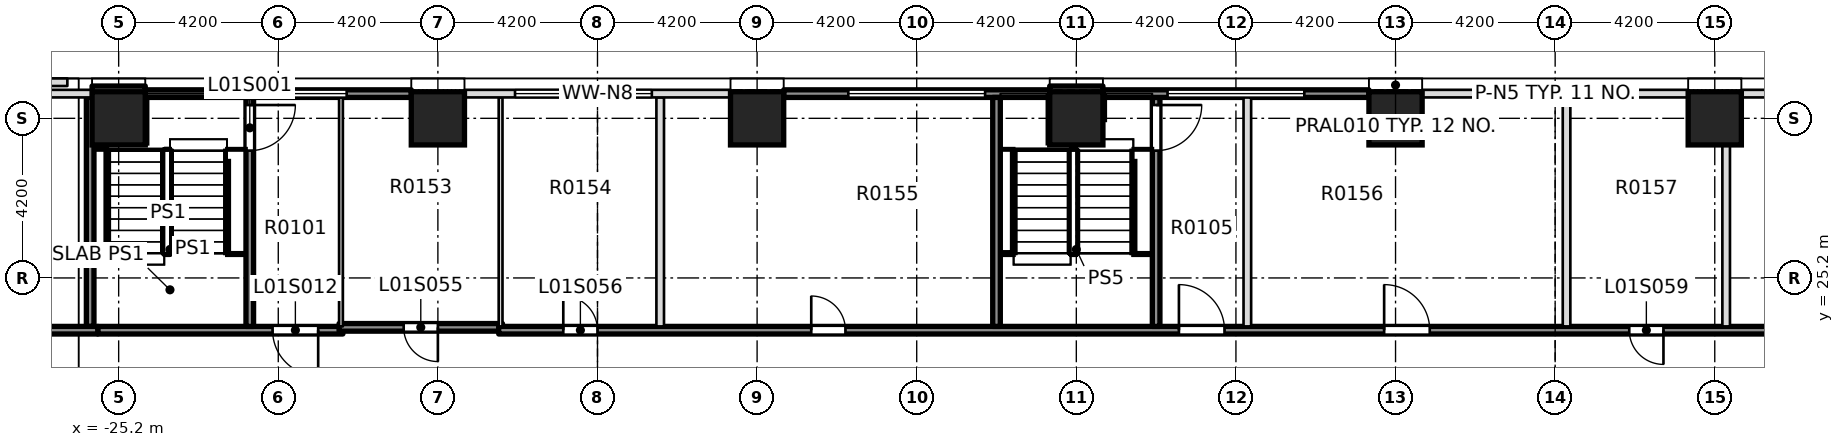
"""IFC4 building model, lengths in metres.
Left out: names, types, materials, properties, quantities, classifications, styles, units other than length and angle.
Written with IfcOpenShell. Run it as: python <this file> out.ifc"""

import sys

from ifc_helpers import new_model, si_unit, direction, frame, frame_2d, origin, origin_2d, place, context, subcontext, project, spatial, rectangle, extrude, element, fill, save


model = new_model("IFC4")
c1 = context("Model", 3, precision=1e-05, world=origin(), true_north=direction((0.0, 1.0)))
c2 = subcontext(c1, "Body", "Model", "MODEL_VIEW")
j1 = project(units=[si_unit("LENGTHUNIT", "METRE"), si_unit("PLANEANGLEUNIT", "RADIAN")], contexts=[c1])
p1 = place(None, origin())
s1 = spatial("IfcSite", under=j1, at=p1, CompositionType="ELEMENT")
p2 = place(p1, origin())
s2 = spatial("IfcBuilding", under=s1, at=p2, CompositionType="ELEMENT")
p3 = place(p2, frame((0.0, 0.0, 7.5)))
s3 = spatial("IfcBuildingStorey", under=s2, at=p3, CompositionType="ELEMENT", Elevation=7.5)
for number, where, z_axis, x_axis in (
    (1, (-25.2, 29.4, 0.0), (0.0, 0.0, 1.0), (1.0, 0.0, 0.0)),
    (2, (-16.8, 29.4, 0.0), (0.0, 0.0, 1.0), (1.0, 0.0, 0.0)),
    (3, (-8.4, 29.4, 0.0), (0.0, 0.0, 1.0), (1.0, 0.0, 0.0)),
    (4, (0.0, 29.4, 0.0), (0.0, 0.0, 1.0), (1.0, 0.0, 0.0)),
    (5, (8.4, 29.4, 0.0), (0.0, 0.0, 1.0), (1.0, 0.0, 0.0)),
    (6, (16.8, 29.4, 0.0), (0.0, 0.0, 1.0), (1.0, 0.0, 0.0)),
):
    element("IfcColumn", number, at=place(p3, frame(where, z_axis=z_axis, x_axis=x_axis)), inside=s3, PredefinedType="COLUMN", context=c2, shape_type="SweptSolid", body=[
        extrude(rectangle(XDim=1.4, YDim=1.4, at=origin_2d()), origin(), (0.0, 0.0, 1.0), 5.0),
    ])
p4 = place(p3, frame((-34.65, 30.35, 5.0), z_axis=(0.0, 0.0, 1.0), x_axis=(1.0, 0.0, 0.0)))
e7 = element("IfcWall", 7, at=p4, inside=s3, PredefinedType="PARAPET", context=c2, shape_type="SweptSolid", body=[
    extrude(rectangle(XDim=8.1, YDim=0.2, at=frame_2d((4.05, 0.0))), origin(), (0.0, 0.0, 1.0), 1.2),
])
p5 = place(p3, frame((-25.75, 23.825, 0.0), z_axis=(0.0, 0.0, 1.0), x_axis=(1.0, 0.0, 0.0)))
e8 = element("IfcWall", 8, at=p5, inside=s3, PredefinedType="SOLIDWALL", context=c2, shape_type="SweptSolid", body=[
    extrude(rectangle(XDim=6.45, YDim=0.2, at=frame_2d((3.225, 0.0))), origin(), (0.0, 0.0, 1.0), 4.6),
])
p6 = place(p5, frame((4.6, 0.0, 0.0)))
e9 = element("IfcOpeningElement", 9, at=p6, cuts=e8, PredefinedType="OPENING", context=c2, shape_type="SweptSolid", body=[
    extrude(rectangle(XDim=1.2, YDim=2.1, at=frame_2d((0.6, 1.05))), frame((0.0, 0.11, 0.0), z_axis=(0.0, -1.0, 0.0), x_axis=(1.0, 0.0, 0.0)), (0.0, 0.0, 1.0), 0.22),
])
p7 = place(p3, frame((-19.4, 23.9, 0.0), z_axis=(0.0, 0.0, 1.0), x_axis=(1.0, 0.0, 0.0)))
e10 = element("IfcWall", 10, at=p7, inside=s3, PredefinedType="SOLIDWALL", context=c2, shape_type="SweptSolid", body=[
    extrude(rectangle(XDim=4.3, YDim=0.2, at=frame_2d((2.15, 0.0))), origin(), (0.0, 0.0, 1.0), 4.6),
])
p8 = place(p7, frame((1.7, 0.0, 0.0)))
e11 = element("IfcOpeningElement", 11, at=p8, cuts=e10, PredefinedType="OPENING", context=c2, shape_type="SweptSolid", body=[
    extrude(rectangle(XDim=0.9, YDim=2.1, at=frame_2d((0.45, 1.05))), frame((0.0, 0.11, 0.0), z_axis=(0.0, -1.0, 0.0), x_axis=(1.0, 0.0, 0.0)), (0.0, 0.0, 1.0), 0.22),
])
p9 = place(p3, frame((-15.2, 23.825, 0.0), z_axis=(0.0, 0.0, 1.0), x_axis=(1.0, 0.0, 0.0)))
e12 = element("IfcWall", 12, at=p9, inside=s3, PredefinedType="SOLIDWALL", context=c2, shape_type="SweptSolid", body=[
    extrude(rectangle(XDim=51.45, YDim=0.2, at=frame_2d((25.725, 0.0))), origin(), (0.0, 0.0, 1.0), 4.6),
])
p10 = place(p9, frame((17.9, 0.0, 0.0)))
e13 = element("IfcOpeningElement", 13, at=p10, cuts=e12, PredefinedType="OPENING", context=c2, shape_type="SweptSolid", body=[
    extrude(rectangle(XDim=1.2, YDim=2.1, at=frame_2d((0.6, 1.05))), frame((0.0, 0.11, 0.0), z_axis=(0.0, -1.0, 0.0), x_axis=(1.0, 0.0, 0.0)), (0.0, 0.0, 1.0), 0.22),
])
p11 = place(p9, frame((1.7, 0.0, 0.0)))
e14 = element("IfcOpeningElement", 14, at=p11, cuts=e12, PredefinedType="OPENING", context=c2, shape_type="SweptSolid", body=[
    extrude(rectangle(XDim=0.9, YDim=2.1, at=frame_2d((0.45, 1.05))), frame((0.0, 0.11, 0.0), z_axis=(0.0, -1.0, 0.0), x_axis=(1.0, 0.0, 0.0)), (0.0, 0.0, 1.0), 0.22),
])
p12 = place(p9, frame((8.225, 0.0, 0.0)))
e15 = element("IfcOpeningElement", 15, at=p12, cuts=e12, PredefinedType="OPENING", context=c2, shape_type="SweptSolid", body=[
    extrude(rectangle(XDim=0.9, YDim=2.1, at=frame_2d((0.45, 1.05))), frame((0.0, 0.11, 0.0), z_axis=(0.0, -1.0, 0.0), x_axis=(1.0, 0.0, 0.0)), (0.0, 0.0, 1.0), 0.22),
])
p13 = place(p9, frame((23.3, 0.0, 0.0)))
e16 = element("IfcOpeningElement", 16, at=p13, cuts=e12, PredefinedType="OPENING", context=c2, shape_type="SweptSolid", body=[
    extrude(rectangle(XDim=1.2, YDim=2.1, at=frame_2d((0.6, 1.05))), frame((0.0, 0.11, 0.0), z_axis=(0.0, -1.0, 0.0), x_axis=(1.0, 0.0, 0.0)), (0.0, 0.0, 1.0), 0.22),
])
p14 = place(p9, frame((29.75, 0.0, 0.0)))
e17 = element("IfcOpeningElement", 17, at=p14, cuts=e12, PredefinedType="OPENING", context=c2, shape_type="SweptSolid", body=[
    extrude(rectangle(XDim=0.9, YDim=2.1, at=frame_2d((0.45, 1.05))), frame((0.0, 0.11, 0.0), z_axis=(0.0, -1.0, 0.0), x_axis=(1.0, 0.0, 0.0)), (0.0, 0.0, 1.0), 0.22),
])
p15 = place(p9, frame((41.375, 0.0, 0.0)))
e18 = element("IfcOpeningElement", 18, at=p15, cuts=e12, PredefinedType="OPENING", context=c2, shape_type="SweptSolid", body=[
    extrude(rectangle(XDim=0.9, YDim=2.1, at=frame_2d((0.45, 1.05))), frame((0.0, 0.11, 0.0), z_axis=(0.0, -1.0, 0.0), x_axis=(1.0, 0.0, 0.0)), (0.0, 0.0, 1.0), 0.22),
])
p16 = place(p3, frame((-21.75, 23.925, 0.0), z_axis=(0.0, 0.0, 1.0), x_axis=(0.0, 1.0, 0.0)))
e19 = element("IfcWall", 19, at=p16, inside=s3, PredefinedType="SOLIDWALL", context=c2, shape_type="SweptSolid", body=[
    extrude(rectangle(XDim=6.025, YDim=0.2, at=frame_2d((3.012, 0.0))), origin(), (0.0, 0.0, 1.0), 4.6),
])
p17 = place(p16, frame((4.625, 0.0, 0.0)))
e20 = element("IfcOpeningElement", 20, at=p17, cuts=e19, PredefinedType="OPENING", context=c2, shape_type="SweptSolid", body=[
    extrude(rectangle(XDim=1.2, YDim=2.1, at=frame_2d((0.6, 1.05))), frame((0.0, 0.11, 0.0), z_axis=(0.0, -1.0, 0.0), x_axis=(1.0, 0.0, 0.0)), (0.0, 0.0, 1.0), 0.22),
])
for number, where, z_axis, x_axis in (
    (21, (-19.35, 23.925, 0.0), (0.0, 0.0, 1.0), (0.0, 1.0, 0.0)),
    (22, (-15.15, 23.925, 0.0), (0.0, 0.0, 1.0), (0.0, 1.0, 0.0)),
):
    element("IfcWall", number, at=place(p3, frame(where, z_axis=z_axis, x_axis=x_axis)), inside=s3, PredefinedType="PARTITIONING", context=c2, shape_type="SweptSolid", body=[
        extrude(rectangle(XDim=6.025, YDim=0.1, at=frame_2d((3.012, 0.0))), origin(), (0.0, 0.0, 1.0), 4.6),
    ])
p18 = place(p3, frame((-10.95, 23.925, 0.0), z_axis=(0.0, 0.0, 1.0), x_axis=(0.0, 1.0, 0.0)))
e23 = element("IfcWall", 23, at=p18, inside=s3, PredefinedType="PARTITIONING", context=c2, shape_type="SweptSolid", body=[
    extrude(rectangle(XDim=6.025, YDim=0.2, at=frame_2d((3.012, 0.0))), origin(), (0.0, 0.0, 1.0), 4.6),
])
p19 = place(p3, frame((2.1, 23.925, 0.0), z_axis=(0.0, 0.0, 1.0), x_axis=(0.0, 1.0, 0.0)))
e24 = element("IfcWall", 24, at=p19, inside=s3, PredefinedType="SOLIDWALL", context=c2, shape_type="SweptSolid", body=[
    extrude(rectangle(XDim=6.025, YDim=0.2, at=frame_2d((3.012, 0.0))), origin(), (0.0, 0.0, 1.0), 4.6),
])
p20 = place(p19, frame((4.625, 0.0, 0.0)))
e25 = element("IfcOpeningElement", 25, at=p20, cuts=e24, PredefinedType="OPENING", context=c2, shape_type="SweptSolid", body=[
    extrude(rectangle(XDim=1.2, YDim=2.1, at=frame_2d((0.6, 1.05))), frame((0.0, 0.11, 0.0), z_axis=(0.0, -1.0, 0.0), x_axis=(1.0, 0.0, 0.0)), (0.0, 0.0, 1.0), 0.22),
])
for number, where, z_axis, x_axis in (
    (26, (4.5, 23.925, 0.0), (0.0, 0.0, 1.0), (0.0, 1.0, 0.0)),
    (27, (12.9, 23.925, 0.0), (0.0, 0.0, 1.0), (0.0, 1.0, 0.0)),
    (28, (17.1, 23.925, 0.0), (0.0, 0.0, 1.0), (0.0, 1.0, 0.0)),
):
    element("IfcWall", number, at=place(p3, frame(where, z_axis=z_axis, x_axis=x_axis)), inside=s3, PredefinedType="PARTITIONING", context=c2, shape_type="SweptSolid", body=[
        extrude(rectangle(XDim=6.025, YDim=0.2, at=frame_2d((3.012, 0.0))), origin(), (0.0, 0.0, 1.0), 4.6),
    ])
p21 = place(p3, frame((24.5, 30.05, 0.0), z_axis=(0.0, 0.0, 1.0), x_axis=(-1.0, 0.0, 0.0)))
e29 = element("IfcWall", 29, at=p21, inside=s3, PredefinedType="STANDARD", context=c2, shape_type="SweptSolid", body=[
    extrude(rectangle(XDim=7.0, YDim=0.2, at=frame_2d((3.5, 0.0))), origin(), (0.0, 0.0, 1.0), 4.6),
])
p22 = place(p21, frame((1.7, 0.0, 0.9)))
e30 = element("IfcOpeningElement", 30, at=p22, cuts=e29, PredefinedType="OPENING", context=c2, shape_type="SweptSolid", body=[
    extrude(rectangle(XDim=3.6, YDim=2.8, at=frame_2d((1.8, 1.4))), frame((0.0, 0.11, 0.0), z_axis=(0.0, -1.0, 0.0), x_axis=(1.0, 0.0, 0.0)), (0.0, 0.0, 1.0), 0.22),
])
p23 = place(p3, frame((16.1, 30.05, 0.0), z_axis=(0.0, 0.0, 1.0), x_axis=(-1.0, 0.0, 0.0)))
e31 = element("IfcWall", 31, at=p23, inside=s3, PredefinedType="STANDARD", context=c2, shape_type="SweptSolid", body=[
    extrude(rectangle(XDim=7.0, YDim=0.2, at=frame_2d((3.5, 0.0))), origin(), (0.0, 0.0, 1.0), 4.6),
])
p24 = place(p23, frame((1.7, 0.0, 0.9)))
e32 = element("IfcOpeningElement", 32, at=p24, cuts=e31, PredefinedType="OPENING", context=c2, shape_type="SweptSolid", body=[
    extrude(rectangle(XDim=3.6, YDim=2.8, at=frame_2d((1.8, 1.4))), frame((0.0, 0.11, 0.0), z_axis=(0.0, -1.0, 0.0), x_axis=(1.0, 0.0, 0.0)), (0.0, 0.0, 1.0), 0.22),
])
p25 = place(p3, frame((0.7, 30.05, 0.0), z_axis=(0.0, 0.0, 1.0), x_axis=(1.0, 0.0, 0.0)))
e33 = element("IfcWall", 33, at=p25, inside=s3, PredefinedType="SOLIDWALL", context=c2, shape_type="SweptSolid", body=[
    extrude(rectangle(XDim=7.0, YDim=0.2, at=frame_2d((3.5, 0.0))), origin(), (0.0, 0.0, 1.0), 4.6),
])
p26 = place(p25, frame((1.7, 0.0, 0.9)))
e34 = element("IfcOpeningElement", 34, at=p26, cuts=e33, PredefinedType="OPENING", context=c2, shape_type="SweptSolid", body=[
    extrude(rectangle(XDim=3.6, YDim=2.8, at=frame_2d((1.8, 1.4))), frame((0.0, 0.11, 0.0), z_axis=(0.0, -1.0, 0.0), x_axis=(1.0, 0.0, 0.0)), (0.0, 0.0, 1.0), 0.22),
])
p27 = place(p3, frame((-7.7, 30.05, 0.0), z_axis=(0.0, 0.0, 1.0), x_axis=(1.0, 0.0, 0.0)))
e35 = element("IfcWall", 35, at=p27, inside=s3, PredefinedType="SOLIDWALL", context=c2, shape_type="SweptSolid", body=[
    extrude(rectangle(XDim=7.0, YDim=0.2, at=frame_2d((3.5, 0.0))), origin(), (0.0, 0.0, 1.0), 4.6),
])
p28 = place(p27, frame((1.7, 0.0, 0.9)))
e36 = element("IfcOpeningElement", 36, at=p28, cuts=e35, PredefinedType="OPENING", context=c2, shape_type="SweptSolid", body=[
    extrude(rectangle(XDim=3.6, YDim=2.8, at=frame_2d((1.8, 1.4))), frame((0.0, 0.11, 0.0), z_axis=(0.0, -1.0, 0.0), x_axis=(1.0, 0.0, 0.0)), (0.0, 0.0, 1.0), 0.22),
])
p29 = place(p3, frame((-9.1, 30.05, 0.0), z_axis=(0.0, 0.0, 1.0), x_axis=(-1.0, 0.0, 0.0)))
e37 = element("IfcWall", 37, at=p29, inside=s3, PredefinedType="STANDARD", context=c2, shape_type="SweptSolid", body=[
    extrude(rectangle(XDim=7.0, YDim=0.2, at=frame_2d((3.5, 0.0))), origin(), (0.0, 0.0, 1.0), 4.6),
])
p30 = place(p29, frame((2.07, 0.0, 0.9)))
e38 = element("IfcOpeningElement", 38, at=p30, cuts=e37, PredefinedType="OPENING", context=c2, shape_type="SweptSolid", body=[
    extrude(rectangle(XDim=3.6, YDim=2.8, at=frame_2d((1.8, 1.4))), frame((0.0, 0.11, 0.0), z_axis=(0.0, -1.0, 0.0), x_axis=(1.0, 0.0, 0.0)), (0.0, 0.0, 1.0), 0.22),
])
p31 = place(p3, frame((-24.5, 30.05, 0.0), z_axis=(0.0, 0.0, 1.0), x_axis=(1.0, 0.0, 0.0)))
e39 = element("IfcWall", 39, at=p31, inside=s3, PredefinedType="SOLIDWALL", context=c2, shape_type="SweptSolid", body=[
    extrude(rectangle(XDim=7.0, YDim=0.2, at=frame_2d((3.5, 0.0))), origin(), (0.0, 0.0, 1.0), 4.6),
])
p32 = place(p31, frame((1.7, 0.0, 0.9)))
e40 = element("IfcOpeningElement", 40, at=p32, cuts=e39, PredefinedType="OPENING", context=c2, shape_type="SweptSolid", body=[
    extrude(rectangle(XDim=3.6, YDim=2.8, at=frame_2d((1.8, 1.4))), frame((0.0, 0.11, 0.0), z_axis=(0.0, -1.0, 0.0), x_axis=(1.0, 0.0, 0.0)), (0.0, 0.0, 1.0), 0.22),
])
p33 = place(p3, frame((-25.9, 30.05, 0.0), z_axis=(0.0, 0.0, 1.0), x_axis=(-1.0, 0.0, 0.0)))
e41 = element("IfcWall", 41, at=p33, inside=s3, PredefinedType="STANDARD", context=c2, shape_type="SweptSolid", body=[
    extrude(rectangle(XDim=7.0, YDim=0.2, at=frame_2d((3.5, 0.0))), origin(), (0.0, 0.0, 1.0), 4.6),
])
p34 = place(p33, frame((1.7, 0.0, 0.9)))
e42 = element("IfcOpeningElement", 42, at=p34, cuts=e41, PredefinedType="OPENING", context=c2, shape_type="SweptSolid", body=[
    extrude(rectangle(XDim=3.6, YDim=2.8, at=frame_2d((1.8, 1.4))), frame((0.0, 0.11, 0.0), z_axis=(0.0, -1.0, 0.0), x_axis=(1.0, 0.0, 0.0)), (0.0, 0.0, 1.0), 0.22),
])
for number, where, z_axis, x_axis in (
    (43, (-25.9, 30.15, 0.0), (0.0, 0.0, 1.0), (1.0, 0.0, 0.0)),
    (44, (-0.7, 30.15, 0.0), (0.0, 0.0, 1.0), (1.0, 0.0, 0.0)),
):
    element("IfcWall", number, at=place(p3, frame(where, z_axis=z_axis, x_axis=x_axis)), inside=s3, PredefinedType="SOLIDWALL", context=c2, shape_type="SweptSolid", body=[
        extrude(rectangle(XDim=1.4, YDim=0.2, at=frame_2d((0.7, 0.0))), origin(), (0.0, 0.0, 1.0), 4.6),
    ])
p35 = place(p3, frame((-25.95, 23.925, 0.0), z_axis=(0.0, 0.0, 1.0), x_axis=(0.0, 1.0, 0.0)))
e45 = element("IfcWall", 45, at=p35, inside=s3, PredefinedType="SOLIDWALL", context=c2, shape_type="SweptSolid", body=[
    extrude(rectangle(XDim=6.025, YDim=0.2, at=frame_2d((3.012, 0.0))), origin(), (0.0, 0.0, 1.0), 4.6),
])
p36 = place(p3, frame((-34.15, 23.825, 0.0), z_axis=(0.0, 0.0, 1.0), x_axis=(1.0, 0.0, 0.0)))
e46 = element("IfcWall", 46, at=p36, inside=s3, PredefinedType="SOLIDWALL", context=c2, shape_type="SweptSolid", body=[
    extrude(rectangle(XDim=8.4, YDim=0.2, at=frame_2d((4.2, 0.0))), origin(), (0.0, 0.0, 1.0), 4.6),
])
p37 = place(p36, frame((3.35, 0.0, 0.0)))
e47 = element("IfcOpeningElement", 47, at=p37, cuts=e46, PredefinedType="OPENING", context=c2, shape_type="SweptSolid", body=[
    extrude(rectangle(XDim=1.5, YDim=2.1, at=frame_2d((0.75, 1.05))), frame((0.0, 0.11, 0.0), z_axis=(0.0, -1.0, 0.0), x_axis=(1.0, 0.0, 0.0)), (0.0, 0.0, 1.0), 0.22),
])
p38 = place(p3, frame((-2.1, 23.925, 0.0), z_axis=(0.0, 0.0, 1.0), x_axis=(0.0, 1.0, 0.0)))
e48 = element("IfcWall", 48, at=p38, inside=s3, PredefinedType="SOLIDWALL", context=c2, shape_type="SweptSolid", body=[
    extrude(rectangle(XDim=6.025, YDim=0.2, at=frame_2d((3.012, 0.0))), origin(), (0.0, 0.0, 1.0), 4.6),
])
p39 = place(p17, origin())
e49 = element("IfcDoor", 49, at=p39, inside=s3, OperationType="DOUBLE_DOOR_SINGLE_SWING", PredefinedType="DOOR", context=c2, shape_type="SweptSolid", body=[
    extrude(rectangle(XDim=1.2, YDim=2.1, at=frame_2d((0.6, 1.05))), frame((0.0, 0.025, 0.0), z_axis=(0.0, -1.0, 0.0), x_axis=(1.0, 0.0, 0.0)), (0.0, 0.0, 1.0), 0.05),
])
fill(e20, e49)
p40 = place(p20, origin())
e50 = element("IfcDoor", 50, at=p40, inside=s3, OperationType="DOUBLE_DOOR_SINGLE_SWING", PredefinedType="DOOR", context=c2, shape_type="SweptSolid", body=[
    extrude(rectangle(XDim=1.2, YDim=2.1, at=frame_2d((0.6, 1.05))), frame((0.0, 0.025, 0.0), z_axis=(0.0, -1.0, 0.0), x_axis=(1.0, 0.0, 0.0)), (0.0, 0.0, 1.0), 0.05),
])
fill(e25, e50)
p41 = place(p6, origin())
e51 = element("IfcDoor", 51, at=p41, inside=s3, OperationType="SINGLE_SWING_RIGHT", PredefinedType="DOOR", context=c2, shape_type="SweptSolid", body=[
    extrude(rectangle(XDim=1.2, YDim=2.1, at=frame_2d((0.6, 1.05))), frame((0.0, 0.025, 0.0), z_axis=(0.0, -1.0, 0.0), x_axis=(1.0, 0.0, 0.0)), (0.0, 0.0, 1.0), 0.05),
])
fill(e9, e51)
p42 = place(p10, origin())
e52 = element("IfcDoor", 52, at=p42, inside=s3, OperationType="SINGLE_SWING_RIGHT", PredefinedType="DOOR", context=c2, shape_type="SweptSolid", body=[
    extrude(rectangle(XDim=1.2, YDim=2.1, at=frame_2d((0.6, 1.05))), frame((0.0, 0.025, 0.0), z_axis=(0.0, -1.0, 0.0), x_axis=(1.0, 0.0, 0.0)), (0.0, 0.0, 1.0), 0.05),
])
fill(e13, e52)
p43 = place(p8, origin())
e53 = element("IfcDoor", 53, at=p43, inside=s3, OperationType="SINGLE_SWING_RIGHT", PredefinedType="DOOR", context=c2, shape_type="SweptSolid", body=[
    extrude(rectangle(XDim=0.9, YDim=2.1, at=frame_2d((0.45, 1.05))), frame((0.0, 0.025, 0.0), z_axis=(0.0, -1.0, 0.0), x_axis=(1.0, 0.0, 0.0)), (0.0, 0.0, 1.0), 0.05),
])
fill(e11, e53)
p44 = place(p11, origin())
e54 = element("IfcDoor", 54, at=p44, inside=s3, OperationType="SINGLE_SWING_RIGHT", PredefinedType="DOOR", context=c2, shape_type="SweptSolid", body=[
    extrude(rectangle(XDim=0.9, YDim=2.1, at=frame_2d((0.45, 1.05))), frame((0.0, 0.025, 0.0), z_axis=(0.0, -1.0, 0.0), x_axis=(1.0, 0.0, 0.0)), (0.0, 0.0, 1.0), 0.05),
])
fill(e14, e54)
p45 = place(p12, origin())
e55 = element("IfcDoor", 55, at=p45, inside=s3, OperationType="SINGLE_SWING_RIGHT", PredefinedType="DOOR", context=c2, shape_type="SweptSolid", body=[
    extrude(rectangle(XDim=0.9, YDim=2.1, at=frame_2d((0.45, 1.05))), frame((0.0, 0.025, 0.0), z_axis=(0.0, -1.0, 0.0), x_axis=(1.0, 0.0, 0.0)), (0.0, 0.0, 1.0), 0.05),
])
fill(e15, e55)
p46 = place(p13, origin())
e56 = element("IfcDoor", 56, at=p46, inside=s3, OperationType="SINGLE_SWING_LEFT", PredefinedType="DOOR", context=c2, shape_type="SweptSolid", body=[
    extrude(rectangle(XDim=1.2, YDim=2.1, at=frame_2d((0.6, 1.05))), frame((0.0, 0.025, 0.0), z_axis=(0.0, -1.0, 0.0), x_axis=(1.0, 0.0, 0.0)), (0.0, 0.0, 1.0), 0.05),
])
fill(e16, e56)
p47 = place(p14, origin())
e57 = element("IfcDoor", 57, at=p47, inside=s3, OperationType="SINGLE_SWING_RIGHT", PredefinedType="DOOR", context=c2, shape_type="SweptSolid", body=[
    extrude(rectangle(XDim=0.9, YDim=2.1, at=frame_2d((0.45, 1.05))), frame((0.0, 0.025, 0.0), z_axis=(0.0, -1.0, 0.0), x_axis=(1.0, 0.0, 0.0)), (0.0, 0.0, 1.0), 0.05),
])
fill(e17, e57)
p48 = place(p24, origin())
e58 = element("IfcWindow", 58, at=p48, inside=s3, PartitioningType="SINGLE_PANEL", PredefinedType="WINDOW", context=c2, shape_type="SweptSolid", body=[
    extrude(rectangle(XDim=3.6, YDim=2.8, at=frame_2d((1.8, 1.4))), frame((0.0, 0.03, 0.0), z_axis=(0.0, -1.0, 0.0), x_axis=(1.0, 0.0, 0.0)), (0.0, 0.0, 1.0), 0.06),
])
fill(e32, e58)
p49 = place(p26, origin())
e59 = element("IfcWindow", 59, at=p49, inside=s3, PartitioningType="SINGLE_PANEL", PredefinedType="WINDOW", context=c2, shape_type="SweptSolid", body=[
    extrude(rectangle(XDim=3.6, YDim=2.8, at=frame_2d((1.8, 1.4))), frame((0.0, 0.03, 0.0), z_axis=(0.0, -1.0, 0.0), x_axis=(1.0, 0.0, 0.0)), (0.0, 0.0, 1.0), 0.06),
])
fill(e34, e59)
p50 = place(p28, origin())
e60 = element("IfcWindow", 60, at=p50, inside=s3, PartitioningType="SINGLE_PANEL", PredefinedType="WINDOW", context=c2, shape_type="SweptSolid", body=[
    extrude(rectangle(XDim=3.6, YDim=2.8, at=frame_2d((1.8, 1.4))), frame((0.0, 0.03, 0.0), z_axis=(0.0, -1.0, 0.0), x_axis=(1.0, 0.0, 0.0)), (0.0, 0.0, 1.0), 0.06),
])
fill(e36, e60)
p51 = place(p30, origin())
e61 = element("IfcWindow", 61, at=p51, inside=s3, PartitioningType="SINGLE_PANEL", PredefinedType="WINDOW", context=c2, shape_type="SweptSolid", body=[
    extrude(rectangle(XDim=3.6, YDim=2.8, at=frame_2d((1.8, 1.4))), frame((0.0, 0.03, 0.0), z_axis=(0.0, -1.0, 0.0), x_axis=(1.0, 0.0, 0.0)), (0.0, 0.0, 1.0), 0.06),
])
fill(e38, e61)
p52 = place(p32, origin())
e62 = element("IfcWindow", 62, at=p52, inside=s3, PartitioningType="SINGLE_PANEL", PredefinedType="WINDOW", context=c2, shape_type="SweptSolid", body=[
    extrude(rectangle(XDim=3.6, YDim=2.8, at=frame_2d((1.8, 1.4))), frame((0.0, 0.03, 0.0), z_axis=(0.0, -1.0, 0.0), x_axis=(1.0, 0.0, 0.0)), (0.0, 0.0, 1.0), 0.06),
])
fill(e40, e62)
save(model, sys.argv[1])
